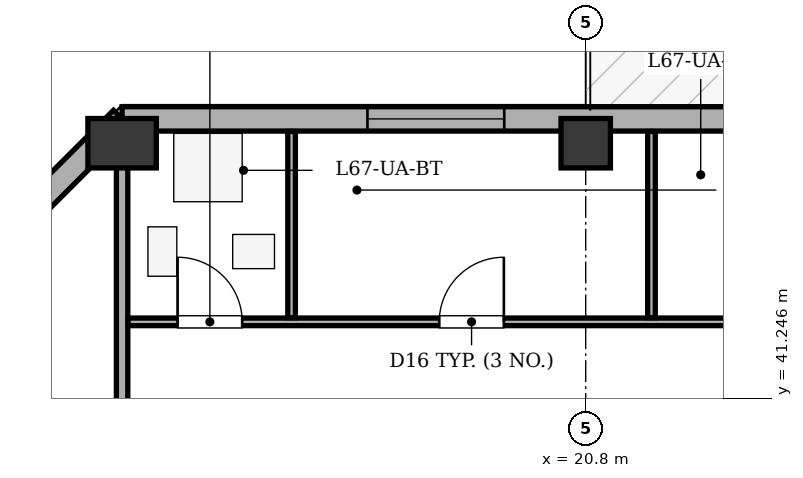
"""IFC4 building model, lengths in metres.
Left out: names, types, materials, properties, quantities, classifications, styles, units other than length and angle.
Written with IfcOpenShell. Run it as: python <this file> out.ifc"""

import sys

from ifc_helpers import new_model, si_unit, direction, frame, frame_2d, origin, origin_2d, place, context, subcontext, project, spatial, rectangle, extrude, element, fill, save


model = new_model("IFC4")
c1 = context("Model", 3, precision=1e-05, world=origin(), true_north=direction((0.0, 1.0)))
c2 = subcontext(c1, "Body", "Model", "MODEL_VIEW")
j1 = project(units=[si_unit("LENGTHUNIT", "METRE"), si_unit("PLANEANGLEUNIT", "RADIAN")], contexts=[c1])
p1 = place(None, origin())
s1 = spatial("IfcSite", under=j1, at=p1, CompositionType="ELEMENT")
p2 = place(p1, origin())
s2 = spatial("IfcBuilding", under=s1, at=p2, CompositionType="ELEMENT")
p3 = place(p2, frame((0.0, 0.0, 255.1)))
s3 = spatial("IfcBuildingStorey", under=s2, at=p3, CompositionType="ELEMENT", Elevation=255.1)
p4 = place(p3, frame((14.7, 44.6, 0.0), z_axis=(0.0, 0.0, 1.0), x_axis=(1.0, 0.0, 0.0)))
e1 = element("IfcColumn", 1, at=p4, inside=s3, PredefinedType="COLUMN", context=c2, shape_type="SweptSolid", body=[
    extrude(rectangle(XDim=0.65, YDim=0.9, at=origin_2d()), origin(), (0.0, 0.0, 1.0), 3.4),
])
p5 = place(p3, frame((20.8, 44.6, 0.0), z_axis=(0.0, 0.0, 1.0), x_axis=(1.0, 0.0, 0.0)))
e2 = element("IfcColumn", 2, at=p5, inside=s3, PredefinedType="COLUMN", context=c2, shape_type="SweptSolid", body=[
    extrude(rectangle(XDim=0.65, YDim=0.65, at=origin_2d()), origin(), (0.0, 0.0, 1.0), 3.4),
])
p6 = place(p3, frame((10.88, 41.1, 0.0), z_axis=(0.0, 0.0, 1.0), x_axis=(0.70712937715, 0.707084184501, 0.0)))
e3 = element("IfcWall", 3, at=p6, inside=s3, PredefinedType="STANDARD", context=c2, shape_type="SweptSolid", body=[
    extrude(rectangle(XDim=5.402, YDim=0.32, at=frame_2d((2.701, 0.0))), origin(), (0.0, 0.0, 1.0), 2.725),
])
p7 = place(p6, frame((2.001, 0.0, 0.75)))
e4 = element("IfcOpeningElement", 4, at=p7, cuts=e3, PredefinedType="OPENING", context=c2, shape_type="SweptSolid", body=[
    extrude(rectangle(XDim=1.4, YDim=1.65, at=frame_2d((0.7, 0.825))), frame((0.0, 0.17, 0.0), z_axis=(0.0, -1.0, 0.0), x_axis=(1.0, 0.0, 0.0)), (0.0, 0.0, 1.0), 0.34),
])
p8 = place(p3, frame((14.7, 44.92, 0.0), z_axis=(0.0, 0.0, 1.0), x_axis=(1.0, 0.0, 0.0)))
e5 = element("IfcWall", 5, at=p8, inside=s3, PredefinedType="STANDARD", context=c2, shape_type="SweptSolid", body=[
    extrude(rectangle(XDim=37.0, YDim=0.32, at=frame_2d((18.5, 0.0))), origin(), (0.0, 0.0, 1.0), 2.725),
])
p9 = place(p8, frame((9.0, 0.0, 0.0)))
e6 = element("IfcOpeningElement", 6, at=p9, cuts=e5, PredefinedType="OPENING", context=c2, shape_type="SweptSolid", body=[
    extrude(rectangle(XDim=1.0, YDim=2.02, at=frame_2d((0.5, 1.01))), frame((0.0, 0.17, 0.0), z_axis=(0.0, -1.0, 0.0), x_axis=(1.0, 0.0, 0.0)), (0.0, 0.0, 1.0), 0.34),
])
p10 = place(p8, frame((3.228, 0.0, 0.75)))
e7 = element("IfcOpeningElement", 7, at=p10, cuts=e5, PredefinedType="OPENING", context=c2, shape_type="SweptSolid", body=[
    extrude(rectangle(XDim=1.8, YDim=1.7, at=frame_2d((0.9, 0.85))), frame((0.0, 0.17, 0.0), z_axis=(0.0, -1.0, 0.0), x_axis=(1.0, 0.0, 0.0)), (0.0, 0.0, 1.0), 0.34),
])
p11 = place(p8, frame((17.392, 0.0, 0.75)))
e8 = element("IfcOpeningElement", 8, at=p11, cuts=e5, PredefinedType="OPENING", context=c2, shape_type="SweptSolid", body=[
    extrude(rectangle(XDim=1.8, YDim=1.7, at=frame_2d((0.9, 0.85))), frame((0.0, 0.17, 0.0), z_axis=(0.0, -1.0, 0.0), x_axis=(1.0, 0.0, 0.0)), (0.0, 0.0, 1.0), 0.34),
])
p12 = place(p8, frame((23.228, 0.0, 0.75)))
e9 = element("IfcOpeningElement", 9, at=p12, cuts=e5, PredefinedType="OPENING", context=c2, shape_type="SweptSolid", body=[
    extrude(rectangle(XDim=1.8, YDim=1.7, at=frame_2d((0.9, 0.85))), frame((0.0, 0.17, 0.0), z_axis=(0.0, -1.0, 0.0), x_axis=(1.0, 0.0, 0.0)), (0.0, 0.0, 1.0), 0.34),
])
p13 = place(p8, frame((27.316, 0.0, 0.75)))
e10 = element("IfcOpeningElement", 10, at=p13, cuts=e5, PredefinedType="OPENING", context=c2, shape_type="SweptSolid", body=[
    extrude(rectangle(XDim=1.8, YDim=1.7, at=frame_2d((0.9, 0.85))), frame((0.0, 0.17, 0.0), z_axis=(0.0, -1.0, 0.0), x_axis=(1.0, 0.0, 0.0)), (0.0, 0.0, 1.0), 0.34),
])
p14 = place(p8, frame((31.315, 0.0, 0.75)))
e11 = element("IfcOpeningElement", 11, at=p14, cuts=e5, PredefinedType="OPENING", context=c2, shape_type="SweptSolid", body=[
    extrude(rectangle(XDim=1.8, YDim=1.7, at=frame_2d((0.9, 0.85))), frame((0.0, 0.17, 0.0), z_axis=(0.0, -1.0, 0.0), x_axis=(1.0, 0.0, 0.0)), (0.0, 0.0, 1.0), 0.34),
])
p15 = place(p8, frame((33.965, 0.0, 0.75)))
e12 = element("IfcOpeningElement", 12, at=p15, cuts=e5, PredefinedType="OPENING", context=c2, shape_type="SweptSolid", body=[
    extrude(rectangle(XDim=1.8, YDim=1.7, at=frame_2d((0.9, 0.85))), frame((0.0, 0.17, 0.0), z_axis=(0.0, -1.0, 0.0), x_axis=(1.0, 0.0, 0.0)), (0.0, 0.0, 1.0), 0.34),
])
p16 = place(p8, frame((11.416, 0.0, 0.75)))
e13 = element("IfcOpeningElement", 13, at=p16, cuts=e5, PredefinedType="OPENING", context=c2, shape_type="SweptSolid", body=[
    extrude(rectangle(XDim=0.75, YDim=1.45, at=frame_2d((0.375, 0.725))), frame((0.0, 0.17, 0.0), z_axis=(0.0, -1.0, 0.0), x_axis=(1.0, 0.0, 0.0)), (0.0, 0.0, 1.0), 0.34),
])
p17 = place(p3, frame((14.7, 36.1, 0.0), z_axis=(0.0, 0.0, 1.0), x_axis=(0.0, 1.0, 0.0)))
e14 = element("IfcWall", 14, at=p17, inside=s3, PredefinedType="PARTITIONING", context=c2, shape_type="SweptSolid", body=[
    extrude(rectangle(XDim=8.655, YDim=0.15, at=frame_2d((4.327, 0.0))), origin(), (0.0, 0.0, 1.0), 3.1),
])
p18 = place(p3, frame((14.78, 42.25, 0.0), z_axis=(0.0, 0.0, 1.0), x_axis=(1.0, 0.0, 0.0)))
e15 = element("IfcWall", 15, at=p18, inside=s3, PredefinedType="PARTITIONING", context=c2, shape_type="SweptSolid", body=[
    extrude(rectangle(XDim=13.889, YDim=0.1, at=frame_2d((6.944, 0.0))), origin(), (0.0, 0.0, 1.0), 3.1),
])
p19 = place(p18, frame((0.65, 0.0, 0.0)))
e16 = element("IfcOpeningElement", 16, at=p19, cuts=e15, PredefinedType="OPENING", context=c2, shape_type="SweptSolid", body=[
    extrude(rectangle(XDim=0.85, YDim=2.05, at=frame_2d((0.425, 1.025))), frame((0.0, 0.06, 0.0), z_axis=(0.0, -1.0, 0.0), x_axis=(1.0, 0.0, 0.0)), (0.0, 0.0, 1.0), 0.12),
])
p20 = place(p18, frame((4.093, 0.0, 0.0)))
e17 = element("IfcOpeningElement", 17, at=p20, cuts=e15, PredefinedType="OPENING", context=c2, shape_type="SweptSolid", body=[
    extrude(rectangle(XDim=0.85, YDim=2.05, at=frame_2d((0.425, 1.025))), frame((0.0, 0.06, 0.0), z_axis=(0.0, -1.0, 0.0), x_axis=(1.0, 0.0, 0.0)), (0.0, 0.0, 1.0), 0.12),
])
p21 = place(p18, frame((8.156, 0.0, 0.0)))
e18 = element("IfcOpeningElement", 18, at=p21, cuts=e15, PredefinedType="OPENING", context=c2, shape_type="SweptSolid", body=[
    extrude(rectangle(XDim=0.9, YDim=2.05, at=frame_2d((0.45, 1.025))), frame((0.0, 0.06, 0.0), z_axis=(0.0, -1.0, 0.0), x_axis=(1.0, 0.0, 0.0)), (0.0, 0.0, 1.0), 0.12),
])
p22 = place(p18, frame((11.598, 0.0, 0.0)))
e19 = element("IfcOpeningElement", 19, at=p22, cuts=e15, PredefinedType="OPENING", context=c2, shape_type="SweptSolid", body=[
    extrude(rectangle(XDim=0.9, YDim=2.05, at=frame_2d((0.45, 1.025))), frame((0.0, 0.06, 0.0), z_axis=(0.0, -1.0, 0.0), x_axis=(1.0, 0.0, 0.0)), (0.0, 0.0, 1.0), 0.12),
])
for number, where, z_axis, x_axis in (
    (20, (16.93, 42.305, 0.0), (0.0, 0.0, 1.0), (0.0, 1.0, 0.0)),
    (21, (21.665, 42.305, 0.0), (0.0, 0.0, 1.0), (0.0, 1.0, 0.0)),
):
    element("IfcWall", number, at=place(p3, frame(where, z_axis=z_axis, x_axis=x_axis)), inside=s3, PredefinedType="PARTITIONING", context=c2, shape_type="SweptSolid", body=[
        extrude(rectangle(XDim=2.45, YDim=0.1, at=frame_2d((1.225, 0.0))), origin(), (0.0, 0.0, 1.0), 3.1),
    ])
p23 = place(p10, origin())
e22 = element("IfcWindow", 22, at=p23, inside=s3, PartitioningType="SINGLE_PANEL", PredefinedType="WINDOW", context=c2, shape_type="SweptSolid", body=[
    extrude(rectangle(XDim=1.8, YDim=1.7, at=frame_2d((0.9, 0.85))), frame((0.0, -0.01, 0.0), z_axis=(0.0, -1.0, 0.0), x_axis=(1.0, 0.0, 0.0)), (0.0, 0.0, 1.0), 0.06),
])
fill(e7, e22)
p24 = place(p19, origin())
e23 = element("IfcDoor", 23, at=p24, inside=s3, OperationType="SINGLE_SWING_LEFT", PredefinedType="DOOR", context=c2, shape_type="SweptSolid", body=[
    extrude(rectangle(XDim=0.85, YDim=2.05, at=frame_2d((0.425, 1.025))), frame((0.0, 0.025, 0.0), z_axis=(0.0, -1.0, 0.0), x_axis=(1.0, 0.0, 0.0)), (0.0, 0.0, 1.0), 0.05),
])
fill(e16, e23)
p25 = place(p20, origin())
e24 = element("IfcDoor", 24, at=p25, inside=s3, OperationType="SINGLE_SWING_RIGHT", PredefinedType="DOOR", context=c2, shape_type="SweptSolid", body=[
    extrude(rectangle(XDim=0.85, YDim=2.05, at=frame_2d((0.425, 1.025))), frame((0.0, 0.025, 0.0), z_axis=(0.0, -1.0, 0.0), x_axis=(1.0, 0.0, 0.0)), (0.0, 0.0, 1.0), 0.05),
])
fill(e17, e24)
save(model, sys.argv[1])
